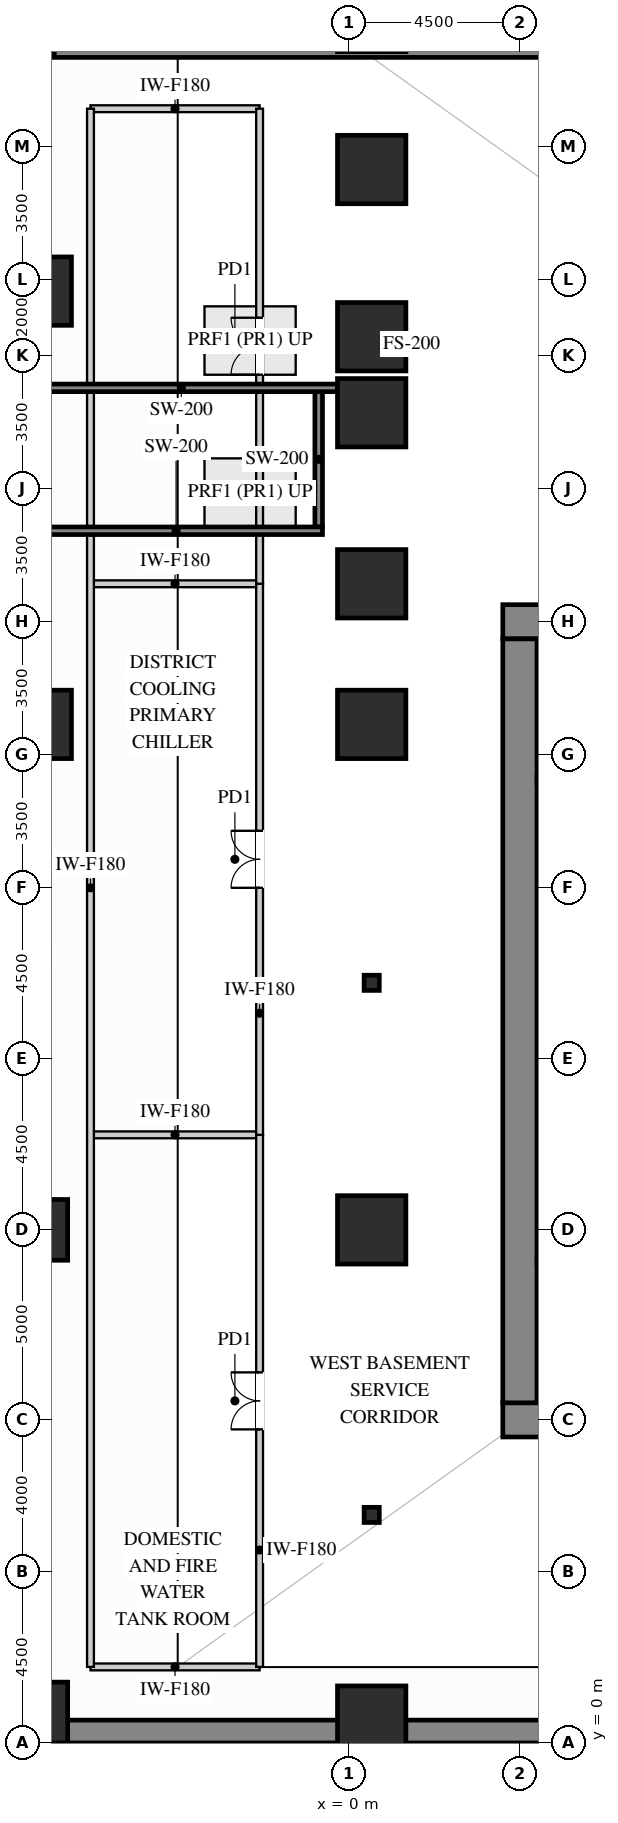
"""IFC4 building model, lengths in metres.
Left out: names, types, materials, properties, quantities, classifications, styles, units other than length and angle.
Written with IfcOpenShell. Run it as: python <this file> out.ifc"""

import sys

from ifc_helpers import new_model, si_unit, direction, frame, frame_2d, origin, origin_2d, place, context, subcontext, project, spatial, rectangle, hollow_rectangle, extrude, source, transform, mapped, element, fill, save


model = new_model("IFC4")
c1 = context("Model", 3, precision=1e-05, world=origin(), true_north=direction((0.0, 1.0)))
c2 = subcontext(c1, "Body", "Model", "MODEL_VIEW")
j1 = project(units=[si_unit("LENGTHUNIT", "METRE"), si_unit("PLANEANGLEUNIT", "RADIAN")], contexts=[c1])
p1 = place(None, origin())
s1 = spatial("IfcSite", under=j1, at=p1, CompositionType="ELEMENT")
p2 = place(p1, origin())
s2 = spatial("IfcBuilding", under=s1, at=p2, CompositionType="ELEMENT")
p3 = place(p2, frame((0.0, 0.0, -9.0)))
s3 = spatial("IfcBuildingStorey", under=s2, at=p3, CompositionType="ELEMENT", Elevation=-9.0)
m1 = source(origin(), c2, "Body", "SweptSolid", [
    extrude(rectangle(XDim=1.6, YDim=1.6, at=origin_2d()), origin(), (0.0, 0.0, 1.0), 4.2),
])
for number, where, z_axis, x_axis in (
    (1, (-8.2, 0.8, 0.0), (0.0, 0.0, 1.0), (1.0, 0.0, 0.0)),
    (2, (-8.2, 13.5, 0.0), (0.0, 0.0, 1.0), (1.0, 0.0, 0.0)),
):
    element("IfcColumn", number, at=place(p3, frame(where, z_axis=z_axis, x_axis=x_axis)), inside=s3, PredefinedType="COLUMN", context=c2, shape_type="MappedRepresentation", body=[
        mapped(m1, transform((0.0, 0.0, 0.0), x_axis=(1.0, 0.0, 0.0), y_axis=(0.0, 1.0, 0.0), z_axis=(0.0, 0.0, 1.0))),
    ])
m2 = source(origin(), c2, "Body", "SweptSolid", [
    extrude(rectangle(XDim=1.8, YDim=1.8, at=origin_2d()), origin(), (0.0, 0.0, 1.0), 4.2),
])
for number, where, z_axis, x_axis in (
    (3, (-8.2, 26.8, 0.0), (0.0, 0.0, 1.0), (1.0, 0.0, 0.0)),
    (4, (-8.2, 38.2, 0.0), (0.0, 0.0, 1.0), (1.0, 0.0, 0.0)),
    (5, (0.6, 0.6, 0.0), (0.0, 0.0, 1.0), (1.0, 0.0, 0.0)),
    (6, (0.6, 13.5, 0.0), (0.0, 0.0, 1.0), (1.0, 0.0, 0.0)),
    (7, (0.6, 26.8, 0.0), (0.0, 0.0, 1.0), (1.0, 0.0, 0.0)),
    (8, (0.6, 30.5, 0.0), (0.0, 0.0, 1.0), (1.0, 0.0, 0.0)),
    (9, (0.6, 35.0, 0.0), (0.0, 0.0, 1.0), (1.0, 0.0, 0.0)),
    (10, (0.6, 37.0, 0.0), (0.0, 0.0, 1.0), (1.0, 0.0, 0.0)),
    (11, (0.6, 41.4, 0.0), (0.0, 0.0, 1.0), (1.0, 0.0, 0.0)),
    (12, (0.6, 45.4, 0.0), (0.0, 0.0, 1.0), (1.0, 0.0, 0.0)),
):
    element("IfcColumn", number, at=place(p3, frame(where, z_axis=z_axis, x_axis=x_axis)), inside=s3, PredefinedType="COLUMN", context=c2, shape_type="MappedRepresentation", body=[
        mapped(m2, transform((0.0, 0.0, 0.0), x_axis=(1.0, 0.0, 0.0), y_axis=(0.0, 1.0, 0.0), z_axis=(0.0, 0.0, 1.0))),
    ])
m3 = source(origin(), c2, "Body", "SweptSolid", [
    extrude(hollow_rectangle(XDim=0.4, YDim=0.4, WallThickness=0.02, at=origin_2d()), origin(), (0.0, 0.0, 1.0), 4.2),
])
for number, where, z_axis, x_axis in (
    (13, (0.6, 6.0, 0.0), (0.0, 0.0, 1.0), (1.0, 0.0, 0.0)),
    (14, (0.6, 20.0, 0.0), (0.0, 0.0, 1.0), (1.0, 0.0, 0.0)),
):
    element("IfcColumn", number, at=place(p3, frame(where, z_axis=z_axis, x_axis=x_axis)), inside=s3, PredefinedType="PILASTER", context=c2, shape_type="MappedRepresentation", body=[
        mapped(m3, transform((0.0, 0.0, 0.0), x_axis=(1.0, 0.0, 0.0), y_axis=(0.0, 1.0, 0.0), z_axis=(0.0, 0.0, 1.0))),
    ])
m4 = source(origin(), c2, "Body", "SweptSolid", [
    extrude(rectangle(XDim=10.9, YDim=0.9, at=frame_2d((5.45, 0.0))), origin(), (0.0, 0.0, 1.0), 4.2),
])
for number, where, z_axis, x_axis in (
    (15, (4.05, 29.5, 0.0), (0.0, 0.0, 1.0), (1.0, 0.0, 0.0)),
    (16, (4.05, 8.5, 0.0), (0.0, 0.0, 1.0), (1.0, 0.0, 0.0)),
):
    element("IfcWall", number, at=place(p3, frame(where, z_axis=z_axis, x_axis=x_axis)), inside=s3, PredefinedType="SHEAR", context=c2, shape_type="MappedRepresentation", body=[
        mapped(m4, transform((0.0, 0.0, 0.0), x_axis=(1.0, 0.0, 0.0), y_axis=(0.0, 1.0, 0.0), z_axis=(0.0, 0.0, 1.0))),
    ])
m5 = source(origin(), c2, "Body", "SweptSolid", [
    extrude(rectangle(XDim=20.1, YDim=0.9, at=frame_2d((10.05, 0.0))), origin(), (0.0, 0.0, 1.0), 4.2),
])
p4 = place(p3, frame((4.5, 8.95, 0.0), z_axis=(0.0, 0.0, 1.0), x_axis=(0.0, 1.0, 0.0)))
e17 = element("IfcWall", 17, at=p4, inside=s3, PredefinedType="SHEAR", context=c2, shape_type="MappedRepresentation", body=[
    mapped(m5, transform((0.0, 0.0, 0.0), x_axis=(1.0, 0.0, 0.0), y_axis=(0.0, 1.0, 0.0), z_axis=(0.0, 0.0, 1.0))),
])
m6 = source(origin(), c2, "Body", "SweptSolid", [
    extrude(rectangle(XDim=4.45, YDim=0.18, at=frame_2d((2.225, 0.0))), origin(), (0.0, 0.0, 1.0), 4.185),
])
for number, where, z_axis, x_axis in (
    (18, (-6.8, 16.0, 0.0), (0.0, 0.0, 1.0), (1.0, 0.0, 0.0)),
    (19, (-6.8, 30.5, 0.0), (0.0, 0.0, 1.0), (1.0, 0.0, 0.0)),
    (20, (-6.8, 43.0, 0.0), (0.0, 0.0, 1.0), (1.0, 0.0, 0.0)),
    (21, (-6.8, 2.0, 0.0), (0.0, 0.0, 1.0), (1.0, 0.0, 0.0)),
):
    element("IfcWall", number, at=place(p3, frame(where, z_axis=z_axis, x_axis=x_axis)), inside=s3, PredefinedType="PARTITIONING", context=c2, shape_type="MappedRepresentation", body=[
        mapped(m6, transform((0.0, 0.0, 0.0), x_axis=(1.0, 0.0, 0.0), y_axis=(0.0, 1.0, 0.0), z_axis=(0.0, 0.0, 1.0))),
    ])
p5 = place(p3, frame((-2.35, 2.0, 0.0), z_axis=(0.0, 0.0, 1.0), x_axis=(0.0, 1.0, 0.0)))
e22 = element("IfcWall", 22, at=p5, inside=s3, PredefinedType="PARTITIONING", context=c2, shape_type="SweptSolid", body=[
    extrude(rectangle(XDim=14.0, YDim=0.18, at=frame_2d((7.0, 0.0))), origin(), (0.0, 0.0, 1.0), 4.185),
])
p6 = place(p5, frame((6.25, 0.0, 0.0)))
e23 = element("IfcOpeningElement", 23, at=p6, cuts=e22, PredefinedType="OPENING", context=c2, shape_type="SweptSolid", body=[
    extrude(rectangle(XDim=1.5, YDim=2.2, at=frame_2d((0.75, 1.1))), frame((0.0, 0.1, 0.0), z_axis=(0.0, -1.0, 0.0), x_axis=(1.0, 0.0, 0.0)), (0.0, 0.0, 1.0), 0.2),
])
p7 = place(p3, frame((-2.35, 16.0, 0.0), z_axis=(0.0, 0.0, 1.0), x_axis=(0.0, 1.0, 0.0)))
e24 = element("IfcWall", 24, at=p7, inside=s3, PredefinedType="PARTITIONING", context=c2, shape_type="SweptSolid", body=[
    extrude(rectangle(XDim=14.5, YDim=0.18, at=frame_2d((7.25, 0.0))), origin(), (0.0, 0.0, 1.0), 4.185),
])
p8 = place(p7, frame((6.5, 0.0, 0.0)))
e25 = element("IfcOpeningElement", 25, at=p8, cuts=e24, PredefinedType="OPENING", context=c2, shape_type="SweptSolid", body=[
    extrude(rectangle(XDim=1.5, YDim=2.2, at=frame_2d((0.75, 1.1))), frame((0.0, 0.1, 0.0), z_axis=(0.0, -1.0, 0.0), x_axis=(1.0, 0.0, 0.0)), (0.0, 0.0, 1.0), 0.2),
])
p9 = place(p3, frame((-2.35, 30.5, 0.0), z_axis=(0.0, 0.0, 1.0), x_axis=(0.0, 1.0, 0.0)))
e26 = element("IfcWall", 26, at=p9, inside=s3, PredefinedType="PARTITIONING", context=c2, shape_type="SweptSolid", body=[
    extrude(rectangle(XDim=12.5, YDim=0.18, at=frame_2d((6.25, 0.0))), origin(), (0.0, 0.0, 1.0), 4.185),
])
p10 = place(p9, frame((5.5, 0.0, 0.0)))
e27 = element("IfcOpeningElement", 27, at=p10, cuts=e26, PredefinedType="OPENING", context=c2, shape_type="SweptSolid", body=[
    extrude(rectangle(XDim=1.5, YDim=2.2, at=frame_2d((0.75, 1.1))), frame((0.0, 0.1, 0.0), z_axis=(0.0, -1.0, 0.0), x_axis=(1.0, 0.0, 0.0)), (0.0, 0.0, 1.0), 0.2),
])
m7 = source(origin(), c2, "Body", "SweptSolid", [
    extrude(rectangle(XDim=41.0, YDim=0.18, at=frame_2d((20.5, 0.0))), origin(), (0.0, 0.0, 1.0), 4.185),
])
p11 = place(p3, frame((-6.8, 2.0, 0.0), z_axis=(0.0, 0.0, 1.0), x_axis=(0.0, 1.0, 0.0)))
e28 = element("IfcWall", 28, at=p11, inside=s3, PredefinedType="PARTITIONING", context=c2, shape_type="MappedRepresentation", body=[
    mapped(m7, transform((0.0, 0.0, 0.0), x_axis=(1.0, 0.0, 0.0), y_axis=(0.0, 1.0, 0.0), z_axis=(0.0, 0.0, 1.0))),
])
m8 = source(origin(), c2, "Body", "SweptSolid", [
    extrude(rectangle(XDim=2.17, YDim=0.18, at=frame_2d((1.085, 0.0))), origin(), (0.0, 0.0, 1.0), 4.185),
])
p12 = place(p3, frame((4.98, 20.92, 0.0), z_axis=(0.0, 0.0, 1.0), x_axis=(1.0, 0.0, 0.0)))
e29 = element("IfcWall", 29, at=p12, inside=s3, PredefinedType="PARTITIONING", context=c2, shape_type="MappedRepresentation", body=[
    mapped(m8, transform((0.0, 0.0, 0.0), x_axis=(1.0, 0.0, 0.0), y_axis=(0.0, 1.0, 0.0), z_axis=(0.0, 0.0, 1.0))),
])
m9 = source(origin(), c2, "Body", "SweptSolid", [
    extrude(rectangle(XDim=84.0, YDim=0.6, at=frame_2d((42.0, 0.0))), origin(), (0.0, 0.0, 1.0), 4.2),
])
p13 = place(p3, frame((-9.0, 0.3, 0.0), z_axis=(0.0, 0.0, 1.0), x_axis=(1.0, 0.0, 0.0)))
e30 = element("IfcWall", 30, at=p13, inside=s3, PredefinedType="USERDEFINED", context=c2, shape_type="MappedRepresentation", body=[
    mapped(m9, transform((0.0, 0.0, 0.0), x_axis=(1.0, 0.0, 0.0), y_axis=(0.0, 1.0, 0.0), z_axis=(0.0, 0.0, 1.0))),
])
p14 = place(p3, frame((4.952, 12.655, 0.0), z_axis=(0.0, 0.0, 1.0), x_axis=(1.0, 0.0, 0.0)))
e31 = element("IfcWall", 31, at=p14, inside=s3, PredefinedType="SHEAR", context=c2, shape_type="SweptSolid", body=[
    extrude(rectangle(XDim=7.453, YDim=0.2, at=frame_2d((3.727, 0.0))), origin(), (0.0, 0.0, 1.0), 4.2),
])
p15 = place(p14, frame((0.4, 0.0, 0.0)))
e32 = element("IfcOpeningElement", 32, at=p15, cuts=e31, PredefinedType="OPENING", context=c2, shape_type="SweptSolid", body=[
    extrude(rectangle(XDim=1.1, YDim=2.15, at=frame_2d((0.55, 1.075))), frame((0.0, 0.11, 0.0), z_axis=(0.0, -1.0, 0.0), x_axis=(1.0, 0.0, 0.0)), (0.0, 0.0, 1.0), 0.22),
])
p16 = place(p3, frame((4.952, 25.345, 0.0), z_axis=(0.0, 0.0, 1.0), x_axis=(1.0, 0.0, 0.0)))
e33 = element("IfcWall", 33, at=p16, inside=s3, PredefinedType="SHEAR", context=c2, shape_type="SweptSolid", body=[
    extrude(rectangle(XDim=7.453, YDim=0.2, at=frame_2d((3.727, 0.0))), origin(), (0.0, 0.0, 1.0), 4.2),
])
p17 = place(p16, frame((0.4, 0.0, 0.0)))
e34 = element("IfcOpeningElement", 34, at=p17, cuts=e33, PredefinedType="OPENING", context=c2, shape_type="SweptSolid", body=[
    extrude(rectangle(XDim=1.1, YDim=2.15, at=frame_2d((0.55, 1.075))), frame((0.0, 0.11, 0.0), z_axis=(0.0, -1.0, 0.0), x_axis=(1.0, 0.0, 0.0)), (0.0, 0.0, 1.0), 0.22),
])
m10 = source(origin(), c2, "Body", "SweptSolid", [
    extrude(rectangle(XDim=3.56, YDim=0.2, at=frame_2d((1.78, 0.0))), origin(), (0.0, 0.0, 1.0), 4.2),
])
p18 = place(p3, frame((-0.795, 31.995, 0.0), z_axis=(0.0, 0.0, 1.0), x_axis=(0.0, 1.0, 0.0)))
e35 = element("IfcWall", 35, at=p18, inside=s3, PredefinedType="SHEAR", context=c2, shape_type="MappedRepresentation", body=[
    mapped(m10, transform((0.0, 0.0, 0.0), x_axis=(1.0, 0.0, 0.0), y_axis=(0.0, 1.0, 0.0), z_axis=(0.0, 0.0, 1.0))),
])
m11 = source(origin(), c2, "Body", "SweptSolid", [
    extrude(rectangle(XDim=8.1, YDim=0.2, at=frame_2d((4.05, 0.0))), origin(), (0.0, 0.0, 1.0), 4.2),
])
p19 = place(p3, frame((-8.4, 35.655, 0.0), z_axis=(0.0, 0.0, 1.0), x_axis=(1.0, 0.0, 0.0)))
e36 = element("IfcWall", 36, at=p19, inside=s3, PredefinedType="SHEAR", context=c2, shape_type="MappedRepresentation", body=[
    mapped(m11, transform((0.0, 0.0, 0.0), x_axis=(1.0, 0.0, 0.0), y_axis=(0.0, 1.0, 0.0), z_axis=(0.0, 0.0, 1.0))),
])
m12 = source(origin(), c2, "Body", "SweptSolid", [
    extrude(rectangle(XDim=7.705, YDim=0.2, at=frame_2d((3.853, 0.0))), origin(), (0.0, 0.0, 1.0), 4.2),
])
p20 = place(p3, frame((-8.4, 31.895, 0.0), z_axis=(0.0, 0.0, 1.0), x_axis=(1.0, 0.0, 0.0)))
e37 = element("IfcWall", 37, at=p20, inside=s3, PredefinedType="SHEAR", context=c2, shape_type="MappedRepresentation", body=[
    mapped(m12, transform((0.0, 0.0, 0.0), x_axis=(1.0, 0.0, 0.0), y_axis=(0.0, 1.0, 0.0), z_axis=(0.0, 0.0, 1.0))),
])
m13 = source(origin(), c2, "Body", "SweptSolid", [
    extrude(rectangle(XDim=34.3, YDim=0.3, at=frame_2d((17.15, 0.0))), origin(), (0.0, 0.0, 1.0), 4.2),
])
p21 = place(p3, frame((-7.75, 44.5, 0.0), z_axis=(0.0, 0.0, 1.0), x_axis=(1.0, 0.0, 0.0)))
e38 = element("IfcWall", 38, at=p21, inside=s3, PredefinedType="SHEAR", context=c2, shape_type="MappedRepresentation", body=[
    mapped(m13, transform((0.0, 0.0, 0.0), x_axis=(1.0, 0.0, 0.0), y_axis=(0.0, 1.0, 0.0), z_axis=(0.0, 0.0, 1.0))),
])
m14 = source(origin(), c2, "Body", "SweptSolid", [
    extrude(rectangle(XDim=1.5, YDim=2.2, at=frame_2d((0.75, 1.1))), frame((0.0, 0.025, 0.0), z_axis=(0.0, -1.0, 0.0), x_axis=(1.0, 0.0, 0.0)), (0.0, 0.0, 1.0), 0.05),
])
p22 = place(p8, origin())
e39 = element("IfcDoor", 39, at=p22, inside=s3, OperationType="DOUBLE_DOOR_SINGLE_SWING", PredefinedType="DOOR", context=c2, shape_type="MappedRepresentation", body=[
    mapped(m14, transform((0.0, 0.0, 0.0), x_axis=(1.0, 0.0, 0.0), y_axis=(0.0, 1.0, 0.0), z_axis=(0.0, 0.0, 1.0))),
])
fill(e25, e39)
p23 = place(p10, origin())
e40 = element("IfcDoor", 40, at=p23, inside=s3, OperationType="DOUBLE_DOOR_SINGLE_SWING", PredefinedType="DOOR", context=c2, shape_type="MappedRepresentation", body=[
    mapped(m14, transform((0.0, 0.0, 0.0), x_axis=(1.0, 0.0, 0.0), y_axis=(0.0, 1.0, 0.0), z_axis=(0.0, 0.0, 1.0))),
])
fill(e27, e40)
p24 = place(p6, origin())
e41 = element("IfcDoor", 41, at=p24, inside=s3, OperationType="DOUBLE_DOOR_SINGLE_SWING", PredefinedType="DOOR", context=c2, shape_type="MappedRepresentation", body=[
    mapped(m14, transform((0.0, 0.0, 0.0), x_axis=(1.0, 0.0, 0.0), y_axis=(0.0, 1.0, 0.0), z_axis=(0.0, 0.0, 1.0))),
])
fill(e23, e41)
save(model, sys.argv[1])
